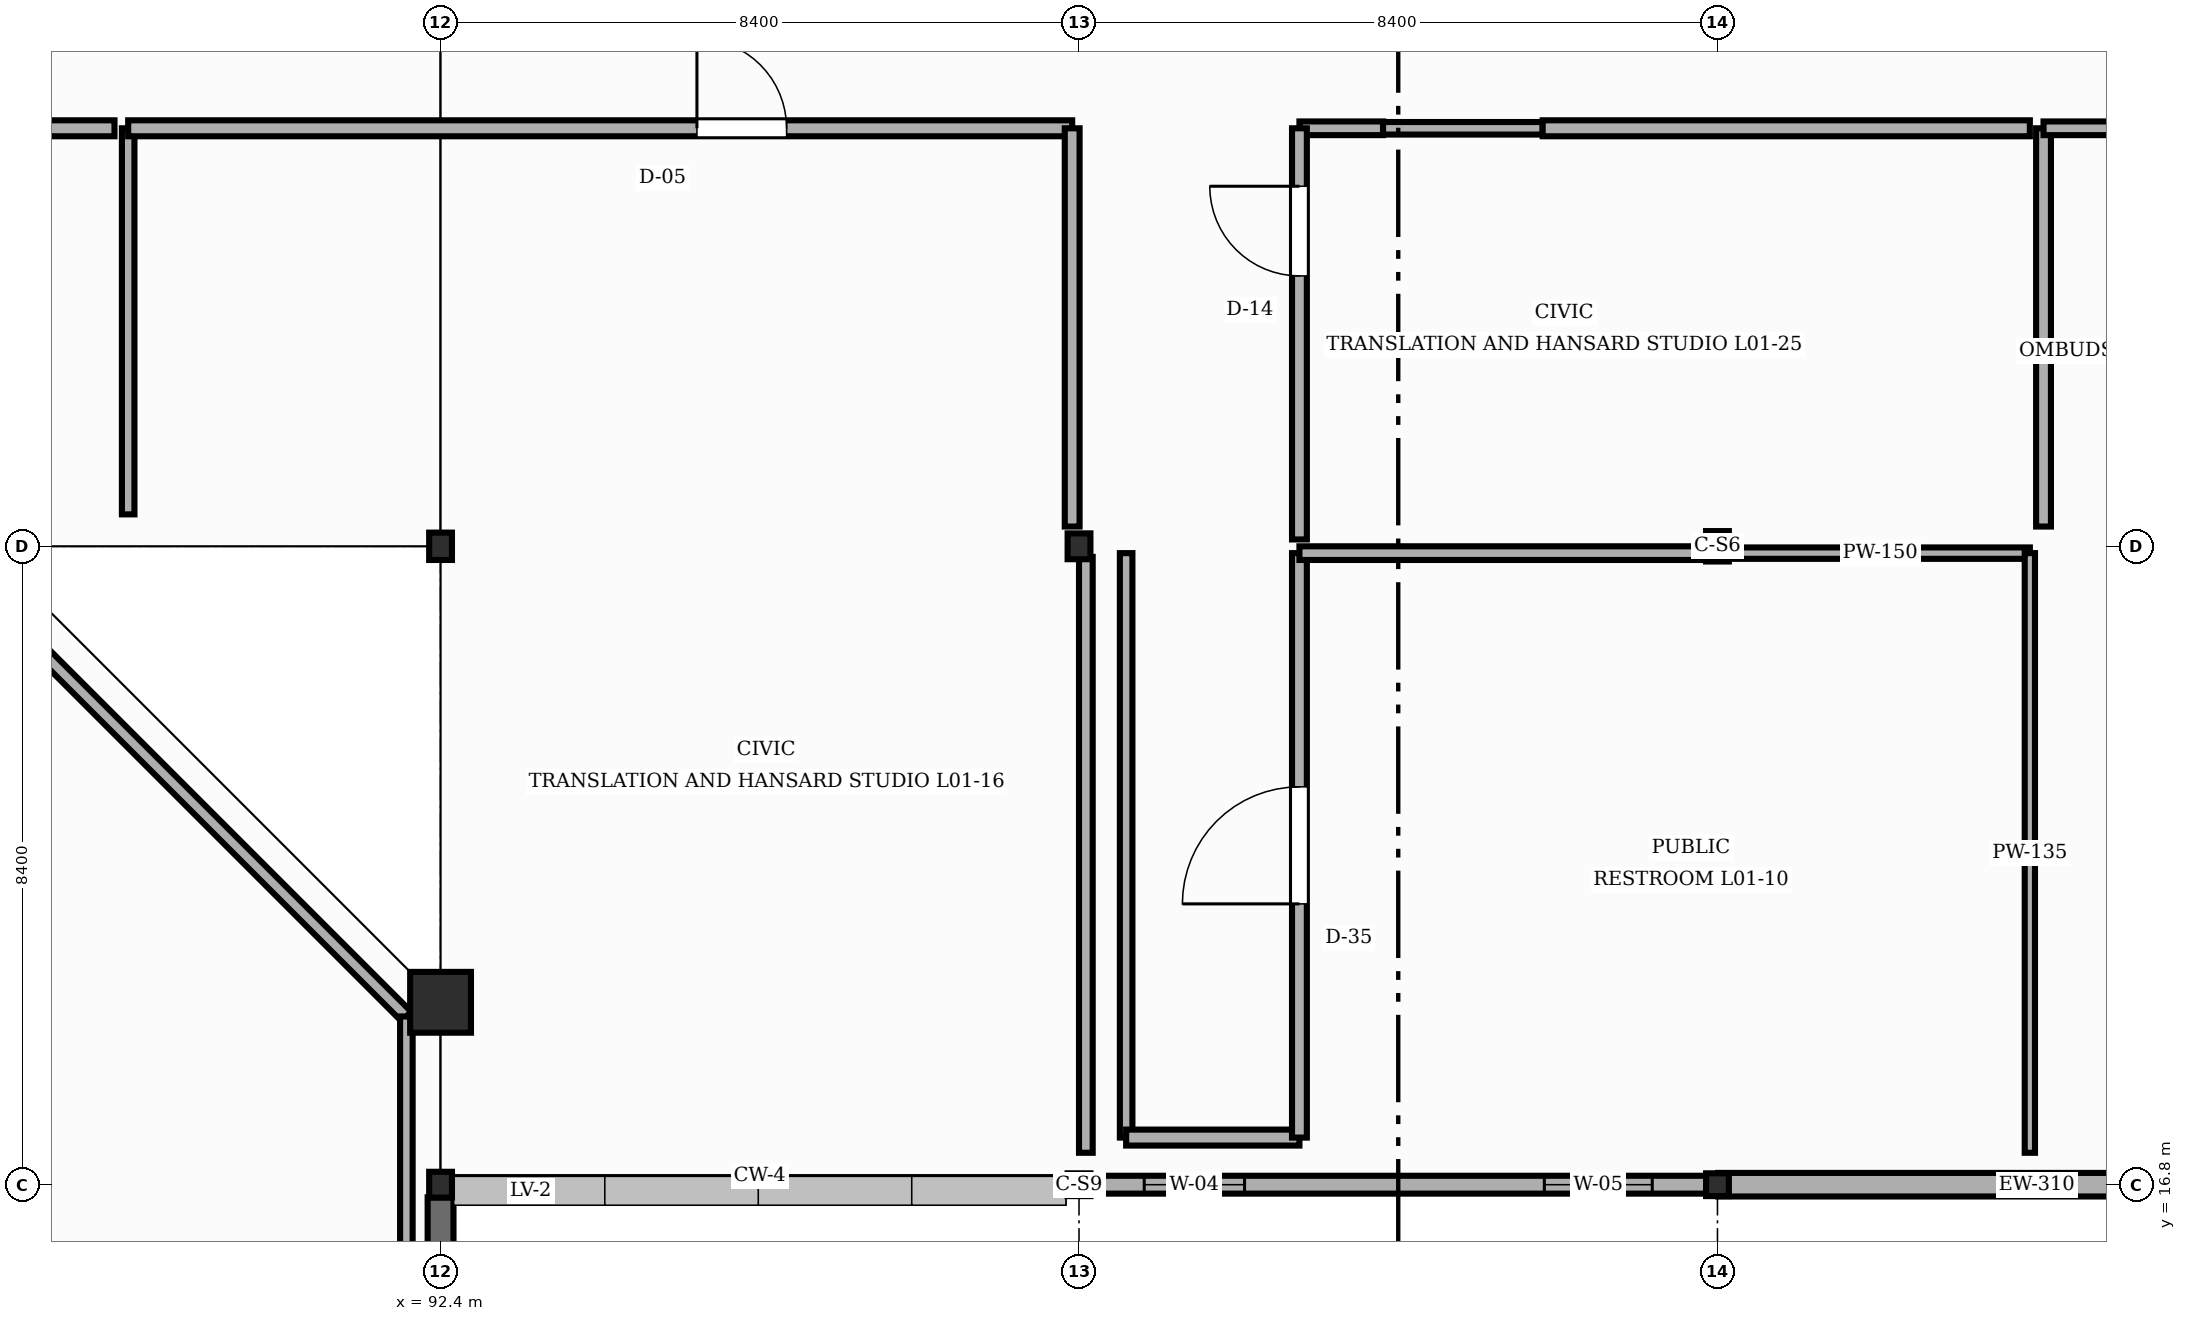
"""IFC4 building model, lengths in metres.
Left out: names, types, materials, properties, quantities, classifications, styles, units other than length and angle.
Written with IfcOpenShell. Run it as: python <this file> out.ifc"""

import sys

from ifc_helpers import new_model, si_unit, direction, frame, frame_2d, origin, origin_2d, place, context, subcontext, project, spatial, rectangle, i_section, extrude, element, fill, save


model = new_model("IFC4")
c1 = context("Model", 3, precision=1e-05, world=origin(), true_north=direction((0.0, 1.0)))
c2 = subcontext(c1, "Body", "Model", "MODEL_VIEW")
j1 = project(units=[si_unit("LENGTHUNIT", "METRE"), si_unit("PLANEANGLEUNIT", "RADIAN")], contexts=[c1])
p1 = place(None, origin())
s1 = spatial("IfcSite", under=j1, at=p1, CompositionType="ELEMENT")
p2 = place(p1, origin())
s2 = spatial("IfcBuilding", under=s1, at=p2, CompositionType="ELEMENT")
p3 = place(p2, frame((0.0, 0.0, 5.4)))
s3 = spatial("IfcBuildingStorey", under=s2, at=p3, CompositionType="ELEMENT", Elevation=5.4)
p4 = place(p3, frame((92.4, 16.8, 0.0), z_axis=(0.0, 0.0, 1.0), x_axis=(1.0, 0.0, 0.0)))
e1 = element("IfcColumn", 1, at=p4, inside=s3, PredefinedType="COLUMN", context=c2, shape_type="SweptSolid", body=[
    extrude(i_section(OverallWidth=0.3, OverallDepth=0.34, WebThickness=0.012, FlangeThickness=0.021, FilletRadius=0.027, at=origin_2d()), origin(), (0.0, 0.0, 1.0), 4.5),
])
p5 = place(p3, frame((92.4, 25.2, 0.0), z_axis=(0.0, 0.0, 1.0), x_axis=(1.0, 0.0, 0.0)))
e2 = element("IfcColumn", 2, at=p5, inside=s3, PredefinedType="COLUMN", context=c2, shape_type="SweptSolid", body=[
    extrude(i_section(OverallWidth=0.3, OverallDepth=0.36, WebThickness=0.012, FlangeThickness=0.022, FilletRadius=0.027, at=origin_2d()), origin(), (0.0, 0.0, 1.0), 4.5),
])
p6 = place(p3, frame((100.8, 16.8, 0.0), z_axis=(0.0, 0.0, 1.0), x_axis=(1.0, 0.0, 0.0)))
e3 = element("IfcColumn", 3, at=p6, inside=s3, PredefinedType="COLUMN", context=c2, shape_type="SweptSolid", body=[
    extrude(i_section(OverallWidth=0.3, OverallDepth=0.3, WebThickness=0.011, FlangeThickness=0.019, FilletRadius=0.027, at=origin_2d()), origin(), (0.0, 0.0, 1.0), 4.5),
])
p7 = place(p3, frame((100.8, 25.2, 0.0), z_axis=(0.0, 0.0, 1.0), x_axis=(1.0, 0.0, 0.0)))
e4 = element("IfcColumn", 4, at=p7, inside=s3, PredefinedType="COLUMN", context=c2, shape_type="SweptSolid", body=[
    extrude(i_section(OverallWidth=0.3, OverallDepth=0.34, WebThickness=0.012, FlangeThickness=0.021, FilletRadius=0.027, at=origin_2d()), origin(), (0.0, 0.0, 1.0), 4.5),
])
p8 = place(p3, frame((109.2, 16.8, 0.0), z_axis=(0.0, 0.0, 1.0), x_axis=(1.0, 0.0, 0.0)))
e5 = element("IfcColumn", 5, at=p8, inside=s3, PredefinedType="COLUMN", context=c2, shape_type="SweptSolid", body=[
    extrude(i_section(OverallWidth=0.3, OverallDepth=0.3, WebThickness=0.011, FlangeThickness=0.019, FilletRadius=0.027, at=origin_2d()), origin(), (0.0, 0.0, 1.0), 4.5),
])
p9 = place(p3, frame((109.2, 25.2, 0.0), z_axis=(0.0, 0.0, 1.0), x_axis=(1.0, 0.0, 0.0)))
e6 = element("IfcColumn", 6, at=p9, inside=s3, PredefinedType="COLUMN", context=c2, shape_type="SweptSolid", body=[
    extrude(i_section(OverallWidth=0.3, OverallDepth=0.4, WebThickness=0.013, FlangeThickness=0.024, FilletRadius=0.027, at=origin_2d()), origin(), (0.0, 0.0, 1.0), 4.5),
])
p10 = place(p3, frame((92.4, 19.2, 0.0), z_axis=(0.0, 0.0, 1.0), x_axis=(1.0, 0.0, 0.0)))
e7 = element("IfcColumn", 7, at=p10, inside=s3, PredefinedType="COLUMN", context=c2, shape_type="SweptSolid", body=[
    extrude(rectangle(XDim=0.8, YDim=0.8, at=origin_2d()), origin(), (0.0, 0.0, 1.0), 4.5),
])
p11 = place(p3, frame((92.4, 8.576, 0.0), z_axis=(0.0, 0.0, 1.0), x_axis=(0.0, 1.0, 0.0)))
e8 = element("IfcWall", 8, at=p11, inside=s3, PredefinedType="SHEAR", context=c2, shape_type="SweptSolid", body=[
    extrude(rectangle(XDim=8.058, YDim=0.34, at=frame_2d((4.029, 0.0))), origin(), (0.0, 0.0, 1.0), 3.382),
])
p12 = place(p11, frame((0.85, 0.0, 1.3)))
e9 = element("IfcOpeningElement", 9, at=p12, cuts=e8, PredefinedType="OPENING", context=c2, shape_type="SweptSolid", body=[
    extrude(rectangle(XDim=1.12, YDim=1.45, at=frame_2d((0.56, 0.725))), frame((0.0, 0.18, 0.0), z_axis=(0.0, -1.0, 0.0), x_axis=(1.0, 0.0, 0.0)), (0.0, 0.0, 1.0), 0.36),
])
p13 = place(p11, frame((5.988, 0.0, 1.3)))
e10 = element("IfcOpeningElement", 10, at=p13, cuts=e8, PredefinedType="OPENING", context=c2, shape_type="SweptSolid", body=[
    extrude(rectangle(XDim=1.22, YDim=1.45, at=frame_2d((0.61, 0.725))), frame((0.0, 0.18, 0.0), z_axis=(0.0, -1.0, 0.0), x_axis=(1.0, 0.0, 0.0)), (0.0, 0.0, 1.0), 0.36),
])
p14 = place(p3, frame((100.808, 16.8, 0.0), z_axis=(0.0, 0.0, 1.0), x_axis=(1.0, 0.0, 0.0)))
e11 = element("IfcWall", 11, at=p14, inside=s3, PredefinedType="STANDARD", context=c2, shape_type="SweptSolid", body=[
    extrude(rectangle(XDim=8.384, YDim=0.235, at=frame_2d((4.192, 0.0))), origin(), (0.0, 0.0, 1.0), 3.922),
])
p15 = place(p14, frame((0.85, 0.0, 0.9)))
e12 = element("IfcOpeningElement", 12, at=p15, cuts=e11, PredefinedType="OPENING", context=c2, shape_type="SweptSolid", body=[
    extrude(rectangle(XDim=1.32, YDim=1.05, at=frame_2d((0.66, 0.525))), frame((0.0, 0.127, 0.0), z_axis=(0.0, -1.0, 0.0), x_axis=(1.0, 0.0, 0.0)), (0.0, 0.0, 1.0), 0.255),
])
p16 = place(p14, frame((6.114, 0.0, 0.9)))
e13 = element("IfcOpeningElement", 13, at=p16, cuts=e11, PredefinedType="OPENING", context=c2, shape_type="SweptSolid", body=[
    extrude(rectangle(XDim=1.42, YDim=1.05, at=frame_2d((0.71, 0.525))), frame((0.0, 0.127, 0.0), z_axis=(0.0, -1.0, 0.0), x_axis=(1.0, 0.0, 0.0)), (0.0, 0.0, 1.0), 0.255),
])
p17 = place(p3, frame((109.208, 16.8, 0.0), z_axis=(0.0, 0.0, 1.0), x_axis=(1.0, 0.0, 0.0)))
e14 = element("IfcWall", 14, at=p17, inside=s3, PredefinedType="STANDARD", context=c2, shape_type="SweptSolid", body=[
    extrude(rectangle(XDim=8.384, YDim=0.31, at=frame_2d((4.192, 0.0))), origin(), (0.0, 0.0, 1.0), 3.952),
])
p18 = place(p3, frame((86.214, 24.75, -0.004), z_axis=(0.0, 0.0, 1.0), x_axis=(0.707106781187, -0.707106781187, 0.0)))
e15 = element("IfcWall", 15, at=p18, inside=s3, PredefinedType="STANDARD", context=c2, shape_type="SweptSolid", body=[
    extrude(rectangle(XDim=8.112, YDim=0.18, at=frame_2d((4.056, 0.0))), origin(), (0.0, 0.0, 1.0), 3.386),
])
p19 = place(p3, frame((91.95, 19.014, -0.004), z_axis=(0.0, 0.0, 1.0), x_axis=(0.0, -1.0, 0.0)))
e16 = element("IfcWall", 16, at=p19, inside=s3, PredefinedType="STANDARD", context=c2, shape_type="SweptSolid", body=[
    extrude(rectangle(XDim=12.827, YDim=0.165, at=frame_2d((6.414, 0.0))), origin(), (0.0, 0.0, 1.0), 3.386),
])
p20 = place(p3, frame((100.89, 17.22, -0.004), z_axis=(0.0, 0.0, 1.0), x_axis=(0.0, 1.0, 0.0)))
e17 = element("IfcWall", 17, at=p20, inside=s3, PredefinedType="STANDARD", context=c2, shape_type="SweptSolid", body=[
    extrude(rectangle(XDim=7.841, YDim=0.18, at=frame_2d((3.92, 0.0))), origin(), (0.0, 0.0, 1.0), 3.926),
])
p21 = place(p3, frame((101.42, 25.11, -0.004), z_axis=(0.0, 0.0, 1.0), x_axis=(0.0, -1.0, 0.0)))
e18 = element("IfcWall", 18, at=p21, inside=s3, PredefinedType="STANDARD", context=c2, shape_type="SweptSolid", body=[
    extrude(rectangle(XDim=7.69, YDim=0.165, at=frame_2d((3.845, 0.0))), origin(), (0.0, 0.0, 1.0), 4.294),
])
p22 = place(p3, frame((101.42, 17.42, -0.004), z_axis=(0.0, 0.0, 1.0), x_axis=(1.0, 0.0, 0.0)))
e19 = element("IfcWall", 19, at=p22, inside=s3, PredefinedType="STANDARD", context=c2, shape_type="SweptSolid", body=[
    extrude(rectangle(XDim=2.28, YDim=0.21, at=frame_2d((1.14, 0.0))), origin(), (0.0, 0.0, 1.0), 4.294),
])
p23 = place(p3, frame((103.7, 17.42, -0.004), z_axis=(0.0, 0.0, 1.0), x_axis=(0.0, 1.0, 0.0)))
e20 = element("IfcWall", 20, at=p23, inside=s3, PredefinedType="STANDARD", context=c2, shape_type="SweptSolid", body=[
    extrude(rectangle(XDim=7.69, YDim=0.195, at=frame_2d((3.845, 0.0))), origin(), (0.0, 0.0, 1.0), 4.016),
])
p24 = place(p23, frame((3.075, 0.0, 0.0)))
e21 = element("IfcOpeningElement", 21, at=p24, cuts=e20, PredefinedType="OPENING", context=c2, shape_type="SweptSolid", body=[
    extrude(rectangle(XDim=1.54, YDim=2.3, at=frame_2d((0.77, 1.15))), frame((0.0, 0.107, 0.0), z_axis=(0.0, -1.0, 0.0), x_axis=(1.0, 0.0, 0.0)), (0.0, 0.0, 1.0), 0.215),
])
p25 = place(p3, frame((103.7, 25.11, -0.004), z_axis=(0.0, 0.0, 1.0), x_axis=(1.0, 0.0, 0.0)))
e22 = element("IfcWall", 22, at=p25, inside=s3, PredefinedType="STANDARD", context=c2, shape_type="SweptSolid", body=[
    extrude(rectangle(XDim=5.326, YDim=0.18, at=frame_2d((2.663, 0.0))), origin(), (0.0, 0.0, 1.0), 3.956),
])
p26 = place(p3, frame((109.374, 25.11, -0.004), z_axis=(0.0, 0.0, 1.0), x_axis=(1.0, 0.0, 0.0)))
e23 = element("IfcWall", 23, at=p26, inside=s3, PredefinedType="STANDARD", context=c2, shape_type="SweptSolid", body=[
    extrude(rectangle(XDim=3.936, YDim=0.15, at=frame_2d((1.968, 0.0))), origin(), (0.0, 0.0, 1.0), 3.926),
])
p27 = place(p3, frame((113.31, 25.11, -0.004), z_axis=(0.0, 0.0, 1.0), x_axis=(0.0, -1.0, 0.0)))
e24 = element("IfcWall", 24, at=p27, inside=s3, PredefinedType="STANDARD", context=c2, shape_type="SweptSolid", body=[
    extrude(rectangle(XDim=7.89, YDim=0.135, at=frame_2d((3.945, 0.0))), origin(), (0.0, 0.0, 1.0), 4.294),
])
p28 = place(p3, frame((113.49, 25.46, -0.004), z_axis=(0.0, 0.0, 1.0), x_axis=(0.0, 1.0, 0.0)))
e25 = element("IfcWall", 25, at=p28, inside=s3, PredefinedType="STANDARD", context=c2, shape_type="SweptSolid", body=[
    extrude(rectangle(XDim=5.24, YDim=0.195, at=frame_2d((2.62, 0.0))), origin(), (0.0, 0.0, 1.0), 4.294),
])
p29 = place(p3, frame((113.49, 30.7, -0.004), z_axis=(0.0, 0.0, 1.0), x_axis=(1.0, 0.0, 0.0)))
e26 = element("IfcWall", 26, at=p29, inside=s3, PredefinedType="STANDARD", context=c2, shape_type="SweptSolid", body=[
    extrude(rectangle(XDim=12.42, YDim=0.18, at=frame_2d((6.21, 0.0))), origin(), (0.0, 0.0, 1.0), 4.294),
])
p30 = place(p29, frame((7.553, 0.0, 0.0)))
e27 = element("IfcOpeningElement", 27, at=p30, cuts=e26, PredefinedType="OPENING", context=c2, shape_type="SweptSolid", body=[
    extrude(rectangle(XDim=1.04, YDim=2.06, at=frame_2d((0.52, 1.03))), frame((0.0, 0.1, 0.0), z_axis=(0.0, -1.0, 0.0), x_axis=(1.0, 0.0, 0.0)), (0.0, 0.0, 1.0), 0.2),
])
p31 = place(p3, frame((88.29, 25.62, -0.004), z_axis=(0.0, 0.0, 1.0), x_axis=(0.0, 1.0, 0.0)))
e28 = element("IfcWall", 28, at=p31, inside=s3, PredefinedType="STANDARD", context=c2, shape_type="SweptSolid", body=[
    extrude(rectangle(XDim=5.08, YDim=0.165, at=frame_2d((2.54, 0.0))), origin(), (0.0, 0.0, 1.0), 4.294),
])
p32 = place(p3, frame((88.29, 30.7, -0.004), z_axis=(0.0, 0.0, 1.0), x_axis=(1.0, 0.0, 0.0)))
e29 = element("IfcWall", 29, at=p32, inside=s3, PredefinedType="STANDARD", context=c2, shape_type="SweptSolid", body=[
    extrude(rectangle(XDim=12.42, YDim=0.21, at=frame_2d((6.21, 0.0))), origin(), (0.0, 0.0, 1.0), 3.986),
])
p33 = place(p32, frame((7.483, 0.0, 0.0)))
e30 = element("IfcOpeningElement", 30, at=p33, cuts=e29, PredefinedType="OPENING", context=c2, shape_type="SweptSolid", body=[
    extrude(rectangle(XDim=1.18, YDim=2.06, at=frame_2d((0.59, 1.03))), frame((0.0, 0.115, 0.0), z_axis=(0.0, -1.0, 0.0), x_axis=(1.0, 0.0, 0.0)), (0.0, 0.0, 1.0), 0.23),
])
p34 = place(p3, frame((100.71, 30.7, -0.004), z_axis=(0.0, 0.0, 1.0), x_axis=(0.0, -1.0, 0.0)))
e31 = element("IfcWall", 31, at=p34, inside=s3, PredefinedType="STANDARD", context=c2, shape_type="SweptSolid", body=[
    extrude(rectangle(XDim=5.24, YDim=0.195, at=frame_2d((2.62, 0.0))), origin(), (0.0, 0.0, 1.0), 3.936),
])
p35 = place(p3, frame((103.7, 30.7, -0.004), z_axis=(0.0, 0.0, 1.0), x_axis=(1.0, 0.0, 0.0)))
e32 = element("IfcWall", 32, at=p35, inside=s3, PredefinedType="STANDARD", context=c2, shape_type="SweptSolid", body=[
    extrude(rectangle(XDim=1.1, YDim=0.18, at=frame_2d((0.55, 0.0))), origin(), (0.0, 0.0, 1.0), 4.294),
])
p36 = place(p3, frame((104.8, 30.7, -0.004), z_axis=(0.0, 0.0, 1.0), x_axis=(1.0, 0.0, 0.0)))
e33 = element("IfcWall", 33, at=p36, inside=s3, PredefinedType="STANDARD", context=c2, shape_type="SweptSolid", body=[
    extrude(rectangle(XDim=2.1, YDim=0.165, at=frame_2d((1.05, 0.0))), origin(), (0.0, 0.0, 1.0), 4.294),
])
p37 = place(p3, frame((106.9, 30.7, -0.004), z_axis=(0.0, 0.0, 1.0), x_axis=(1.0, 0.0, 0.0)))
e34 = element("IfcWall", 34, at=p37, inside=s3, PredefinedType="STANDARD", context=c2, shape_type="SweptSolid", body=[
    extrude(rectangle(XDim=6.41, YDim=0.21, at=frame_2d((3.205, 0.0))), origin(), (0.0, 0.0, 1.0), 4.294),
])
p38 = place(p3, frame((103.7, 25.29, -0.004), z_axis=(0.0, 0.0, 1.0), x_axis=(0.0, 1.0, 0.0)))
e35 = element("IfcWall", 35, at=p38, inside=s3, PredefinedType="STANDARD", context=c2, shape_type="SweptSolid", body=[
    extrude(rectangle(XDim=5.41, YDim=0.195, at=frame_2d((2.705, 0.0))), origin(), (0.0, 0.0, 1.0), 4.046),
])
p39 = place(p38, frame((3.468, 0.0, 0.0)))
e36 = element("IfcOpeningElement", 36, at=p39, cuts=e35, PredefinedType="OPENING", context=c2, shape_type="SweptSolid", body=[
    extrude(rectangle(XDim=1.18, YDim=2.14, at=frame_2d((0.59, 1.07))), frame((0.0, 0.107, 0.0), z_axis=(0.0, -1.0, 0.0), x_axis=(1.0, 0.0, 0.0)), (0.0, 0.0, 1.0), 0.215),
])
p40 = place(p3, frame((82.58, 30.7, -0.004), z_axis=(0.0, 0.0, 1.0), x_axis=(1.0, 0.0, 0.0)))
e37 = element("IfcWall", 37, at=p40, inside=s3, PredefinedType="STANDARD", context=c2, shape_type="SweptSolid", body=[
    extrude(rectangle(XDim=5.53, YDim=0.21, at=frame_2d((2.765, 0.0))), origin(), (0.0, 0.0, 1.0), 3.986),
])
p41 = place(p15, origin())
e38 = element("IfcWindow", 38, at=p41, inside=s3, PartitioningType="SINGLE_PANEL", PredefinedType="WINDOW", context=c2, shape_type="SweptSolid", body=[
    extrude(rectangle(XDim=1.32, YDim=1.05, at=frame_2d((0.66, 0.525))), frame((0.0, 0.03, 0.0), z_axis=(0.0, -1.0, 0.0), x_axis=(1.0, 0.0, 0.0)), (0.0, 0.0, 1.0), 0.06),
])
fill(e12, e38)
p42 = place(p16, origin())
e39 = element("IfcWindow", 39, at=p42, inside=s3, PartitioningType="SINGLE_PANEL", PredefinedType="WINDOW", context=c2, shape_type="SweptSolid", body=[
    extrude(rectangle(XDim=1.42, YDim=1.05, at=frame_2d((0.71, 0.525))), frame((0.0, 0.03, 0.0), z_axis=(0.0, -1.0, 0.0), x_axis=(1.0, 0.0, 0.0)), (0.0, 0.0, 1.0), 0.06),
])
fill(e13, e39)
p43 = place(p24, origin())
e40 = element("IfcDoor", 40, at=p43, inside=s3, OperationType="SINGLE_SWING_LEFT", PredefinedType="DOOR", context=c2, shape_type="SweptSolid", body=[
    extrude(rectangle(XDim=1.54, YDim=2.3, at=frame_2d((0.77, 1.15))), frame((0.0, 0.025, 0.0), z_axis=(0.0, -1.0, 0.0), x_axis=(1.0, 0.0, 0.0)), (0.0, 0.0, 1.0), 0.05),
])
fill(e21, e40)
p44 = place(p33, origin())
e41 = element("IfcDoor", 41, at=p44, inside=s3, OperationType="SINGLE_SWING_LEFT", PredefinedType="DOOR", context=c2, shape_type="SweptSolid", body=[
    extrude(rectangle(XDim=1.18, YDim=2.06, at=frame_2d((0.59, 1.03))), frame((0.0, 0.025, 0.0), z_axis=(0.0, -1.0, 0.0), x_axis=(1.0, 0.0, 0.0)), (0.0, 0.0, 1.0), 0.05),
])
fill(e30, e41)
p45 = place(p39, origin())
e42 = element("IfcDoor", 42, at=p45, inside=s3, OperationType="SINGLE_SWING_RIGHT", PredefinedType="DOOR", context=c2, shape_type="SweptSolid", body=[
    extrude(rectangle(XDim=1.18, YDim=2.14, at=frame_2d((0.59, 1.07))), frame((0.0, 0.025, 0.0), z_axis=(0.0, -1.0, 0.0), x_axis=(1.0, 0.0, 0.0)), (0.0, 0.0, 1.0), 0.05),
])
fill(e36, e42)
save(model, sys.argv[1])
